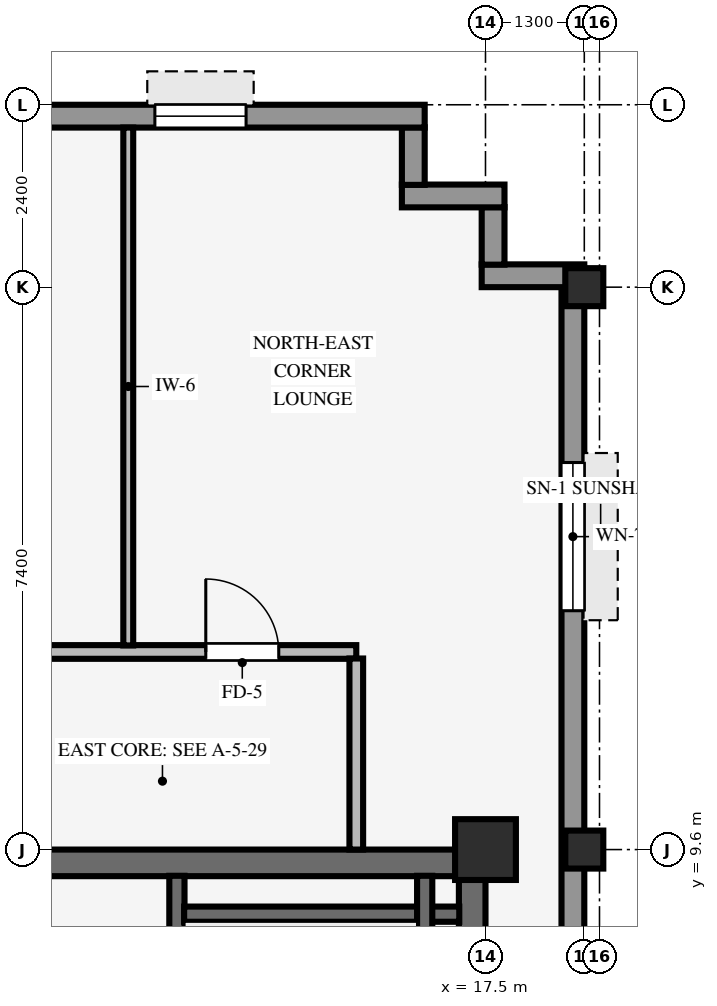
"""IFC4 building model, lengths in metres.
Left out: names, types, materials, properties, quantities, classifications, styles, units other than length and angle.
Written with IfcOpenShell. Run it as: python <this file> out.ifc"""

import sys

from ifc_helpers import new_model, si_unit, direction, frame, frame_2d, origin, origin_2d, place, context, subcontext, project, spatial, rectangle, hollow_rectangle, extrude, source, transform, mapped, element, fill, save


model = new_model("IFC4")
c1 = context("Model", 3, precision=1e-05, world=origin(), true_north=direction((0.0, 1.0)))
c2 = subcontext(c1, "Body", "Model", "MODEL_VIEW")
j1 = project(units=[si_unit("LENGTHUNIT", "METRE"), si_unit("PLANEANGLEUNIT", "RADIAN")], contexts=[c1])
p1 = place(None, origin())
s1 = spatial("IfcSite", under=j1, at=p1, CompositionType="ELEMENT")
p2 = place(p1, origin())
s2 = spatial("IfcBuilding", under=s1, at=p2, CompositionType="ELEMENT")
p3 = place(p2, frame((0.0, 0.0, 272.55)))
s3 = spatial("IfcBuildingStorey", under=s2, at=p3, CompositionType="ELEMENT", Elevation=272.55)
p4 = place(p3, frame((9.0, 9.425, 0.0), z_axis=(0.0, 0.0, 1.0), x_axis=(1.0, 0.0, 0.0)))
e1 = element("IfcWall", 1, at=p4, inside=s3, PredefinedType="SHEAR", context=c2, shape_type="SweptSolid", body=[
    extrude(rectangle(XDim=8.5, YDim=0.35, at=frame_2d((4.25, 0.0))), origin(), (0.0, 0.0, 1.0), 3.37),
])
p5 = place(p3, frame((17.325, -9.255, 0.0), z_axis=(0.0, 0.0, 1.0), x_axis=(0.0, 1.0, 0.0)))
e2 = element("IfcWall", 2, at=p5, inside=s3, PredefinedType="SHEAR", context=c2, shape_type="SweptSolid", body=[
    extrude(rectangle(XDim=18.51, YDim=0.35, at=frame_2d((9.255, 0.0))), origin(), (0.0, 0.0, 1.0), 3.37),
])
p6 = place(p3, frame((17.5, 9.6, 0.0), z_axis=(0.0, 0.0, 1.0), x_axis=(1.0, 0.0, 0.0)))
e3 = element("IfcColumn", 3, at=p6, inside=s3, PredefinedType="COLUMN", context=c2, shape_type="SweptSolid", body=[
    extrude(rectangle(XDim=0.8, YDim=0.8, at=origin_2d()), origin(), (0.0, 0.0, 1.0), 3.37),
])
for number, where, z_axis, x_axis in (
    (4, (18.8, 9.6, 0.0), (0.0, 0.0, 1.0), (1.0, 0.0, 0.0)),
    (5, (18.8, 17.0, 0.0), (0.0, 0.0, 1.0), (1.0, 0.0, 0.0)),
):
    element("IfcColumn", number, at=place(p3, frame(where, z_axis=z_axis, x_axis=x_axis)), inside=s3, PredefinedType="COLUMN", context=c2, shape_type="SweptSolid", body=[
        extrude(hollow_rectangle(XDim=0.5, YDim=0.5, WallThickness=0.032, InnerFilletRadius=0.032, OuterFilletRadius=0.064, at=origin_2d()), origin(), (0.0, 0.0, 1.0), 3.37),
    ])
p7 = place(p3, frame((18.65, -17.004, 0.0), z_axis=(0.0, 0.0, 1.0), x_axis=(0.0, 1.0, 0.0)))
e6 = element("IfcWall", 6, at=p7, inside=s3, PredefinedType="STANDARD", context=c2, shape_type="SweptSolid", body=[
    extrude(rectangle(XDim=34.008, YDim=0.3, at=frame_2d((17.004, 0.0))), origin(), (0.0, 0.0, 1.0), 2.705),
])
p8 = place(p7, frame((2.311, 0.0, 0.8)))
e7 = element("IfcOpeningElement", 7, at=p8, cuts=e6, PredefinedType="OPENING", context=c2, shape_type="SweptSolid", body=[
    extrude(rectangle(XDim=1.95, YDim=1.48, at=frame_2d((0.975, 0.74))), frame((0.0, 0.16, 0.0), z_axis=(0.0, -1.0, 0.0), x_axis=(1.0, 0.0, 0.0)), (0.0, 0.0, 1.0), 0.32),
])
p9 = place(p7, frame((29.747, 0.0, 0.8)))
e8 = element("IfcOpeningElement", 8, at=p9, cuts=e6, PredefinedType="OPENING", context=c2, shape_type="SweptSolid", body=[
    extrude(rectangle(XDim=1.95, YDim=1.48, at=frame_2d((0.975, 0.74))), frame((0.0, 0.16, 0.0), z_axis=(0.0, -1.0, 0.0), x_axis=(1.0, 0.0, 0.0)), (0.0, 0.0, 1.0), 0.32),
])
p10 = place(p3, frame((17.45, 17.15, 0.0), z_axis=(0.0, 0.0, 1.0), x_axis=(1.0, 0.0, 0.0)))
e9 = element("IfcWall", 9, at=p10, inside=s3, PredefinedType="STANDARD", context=c2, shape_type="SweptSolid", body=[
    extrude(rectangle(XDim=1.35, YDim=0.3, at=frame_2d((0.675, 0.0))), origin(), (0.0, 0.0, 1.0), 2.892),
])
p11 = place(p3, frame((17.6, 17.296, 0.0), z_axis=(0.0, 0.0, 1.0), x_axis=(0.0, 1.0, 0.0)))
e10 = element("IfcWall", 10, at=p11, inside=s3, PredefinedType="STANDARD", context=c2, shape_type="SweptSolid", body=[
    extrude(rectangle(XDim=0.758, YDim=0.3, at=frame_2d((0.379, 0.0))), origin(), (0.0, 0.0, 1.0), 2.892),
])
p12 = place(p3, frame((16.4, 18.2, 0.0), z_axis=(0.0, 0.0, 1.0), x_axis=(1.0, 0.0, 0.0)))
e11 = element("IfcWall", 11, at=p12, inside=s3, PredefinedType="STANDARD", context=c2, shape_type="SweptSolid", body=[
    extrude(rectangle(XDim=1.35, YDim=0.3, at=frame_2d((0.675, 0.0))), origin(), (0.0, 0.0, 1.0), 2.892),
])
p13 = place(p3, frame((16.55, 18.346, 0.0), z_axis=(0.0, 0.0, 1.0), x_axis=(0.0, 1.0, 0.0)))
e12 = element("IfcWall", 12, at=p13, inside=s3, PredefinedType="STANDARD", context=c2, shape_type="SweptSolid", body=[
    extrude(rectangle(XDim=0.758, YDim=0.3, at=frame_2d((0.379, 0.0))), origin(), (0.0, 0.0, 1.0), 2.892),
])
p14 = place(p3, frame((-18.9, 19.25, 0.0), z_axis=(0.0, 0.0, 1.0), x_axis=(1.0, 0.0, 0.0)))
e13 = element("IfcWall", 13, at=p14, inside=s3, PredefinedType="STANDARD", context=c2, shape_type="SweptSolid", body=[
    extrude(rectangle(XDim=35.6, YDim=0.3, at=frame_2d((17.8, 0.0))), origin(), (0.0, 0.0, 1.0), 2.705),
])
p15 = place(p14, frame((13.5, 0.0, 0.0)))
e14 = element("IfcOpeningElement", 14, at=p15, cuts=e13, PredefinedType="OPENING", context=c2, shape_type="SweptSolid", body=[
    extrude(rectangle(XDim=1.05, YDim=2.1, at=frame_2d((0.525, 1.05))), frame((0.0, 0.16, 0.0), z_axis=(0.0, -1.0, 0.0), x_axis=(1.0, 0.0, 0.0)), (0.0, 0.0, 1.0), 0.32),
])
p16 = place(p14, frame((3.7, 0.0, 0.8)))
e15 = element("IfcOpeningElement", 15, at=p16, cuts=e13, PredefinedType="OPENING", context=c2, shape_type="SweptSolid", body=[
    extrude(rectangle(XDim=1.2, YDim=1.48, at=frame_2d((0.6, 0.74))), frame((0.0, 0.16, 0.0), z_axis=(0.0, -1.0, 0.0), x_axis=(1.0, 0.0, 0.0)), (0.0, 0.0, 1.0), 0.32),
])
p17 = place(p14, frame((16.75, 0.0, 0.8)))
e16 = element("IfcOpeningElement", 16, at=p17, cuts=e13, PredefinedType="OPENING", context=c2, shape_type="SweptSolid", body=[
    extrude(rectangle(XDim=1.2, YDim=1.48, at=frame_2d((0.6, 0.74))), frame((0.0, 0.16, 0.0), z_axis=(0.0, -1.0, 0.0), x_axis=(1.0, 0.0, 0.0)), (0.0, 0.0, 1.0), 0.32),
])
p18 = place(p14, frame((22.0, 0.0, 0.8)))
e17 = element("IfcOpeningElement", 17, at=p18, cuts=e13, PredefinedType="OPENING", context=c2, shape_type="SweptSolid", body=[
    extrude(rectangle(XDim=1.2, YDim=1.48, at=frame_2d((0.6, 0.74))), frame((0.0, 0.16, 0.0), z_axis=(0.0, -1.0, 0.0), x_axis=(1.0, 0.0, 0.0)), (0.0, 0.0, 1.0), 0.32),
])
p19 = place(p14, frame((25.9, 0.0, 0.8)))
e18 = element("IfcOpeningElement", 18, at=p19, cuts=e13, PredefinedType="OPENING", context=c2, shape_type="SweptSolid", body=[
    extrude(rectangle(XDim=1.2, YDim=1.48, at=frame_2d((0.6, 0.74))), frame((0.0, 0.16, 0.0), z_axis=(0.0, -1.0, 0.0), x_axis=(1.0, 0.0, 0.0)), (0.0, 0.0, 1.0), 0.32),
])
p20 = place(p14, frame((32.05, 0.0, 0.8)))
e19 = element("IfcOpeningElement", 19, at=p20, cuts=e13, PredefinedType="OPENING", context=c2, shape_type="SweptSolid", body=[
    extrude(rectangle(XDim=1.2, YDim=1.48, at=frame_2d((0.6, 0.74))), frame((0.0, 0.16, 0.0), z_axis=(0.0, -1.0, 0.0), x_axis=(1.0, 0.0, 0.0)), (0.0, 0.0, 1.0), 0.32),
])
p21 = place(p3, frame((13.44, 0.9, 0.0), z_axis=(0.0, 0.0, 1.0), x_axis=(0.0, 1.0, 0.0)))
e20 = element("IfcWall", 20, at=p21, inside=s3, PredefinedType="SHEAR", context=c2, shape_type="SweptSolid", body=[
    extrude(rectangle(XDim=8.355, YDim=0.2, at=frame_2d((4.177, 0.0))), origin(), (0.0, 0.0, 1.0), 3.37),
])
p22 = place(p21, frame((0.43, 0.0, 0.0)))
e21 = element("IfcOpeningElement", 21, at=p22, cuts=e20, PredefinedType="OPENING", context=c2, shape_type="SweptSolid", body=[
    extrude(rectangle(XDim=1.1, YDim=2.15, at=frame_2d((0.55, 1.075))), frame((0.0, 0.11, 0.0), z_axis=(0.0, -1.0, 0.0), x_axis=(1.0, 0.0, 0.0)), (0.0, 0.0, 1.0), 0.22),
])
p23 = place(p3, frame((13.535, 8.75, 0.0), z_axis=(0.0, 0.0, 1.0), x_axis=(1.0, 0.0, 0.0)))
e22 = element("IfcWall", 22, at=p23, inside=s3, PredefinedType="SHEAR", context=c2, shape_type="SweptSolid", body=[
    extrude(rectangle(XDim=3.62, YDim=0.2, at=frame_2d((1.81, 0.0))), origin(), (0.0, 0.0, 1.0), 3.37),
])
p24 = place(p3, frame((16.7, 1.095, 0.0), z_axis=(0.0, 0.0, 1.0), x_axis=(0.0, 1.0, 0.0)))
e23 = element("IfcWall", 23, at=p24, inside=s3, PredefinedType="SHEAR", context=c2, shape_type="SweptSolid", body=[
    extrude(rectangle(XDim=8.16, YDim=0.2, at=frame_2d((4.08, 0.0))), origin(), (0.0, 0.0, 1.0), 3.37),
])
p25 = place(p3, frame((-15.0, 12.2, 0.0), z_axis=(0.0, 0.0, 1.0), x_axis=(1.0, 0.0, 0.0)))
e24 = element("IfcWall", 24, at=p25, inside=s3, PredefinedType="PARTITIONING", context=c2, shape_type="SweptSolid", body=[
    extrude(rectangle(XDim=30.8, YDim=0.18, at=frame_2d((15.4, 0.0))), origin(), (0.0, 0.0, 1.0), 3.36),
])
p26 = place(p25, frame((1.42, 0.0, 0.0)))
e25 = element("IfcOpeningElement", 25, at=p26, cuts=e24, PredefinedType="OPENING", context=c2, shape_type="SweptSolid", body=[
    extrude(rectangle(XDim=0.96, YDim=2.1, at=frame_2d((0.48, 1.05))), frame((0.0, 0.1, 0.0), z_axis=(0.0, -1.0, 0.0), x_axis=(1.0, 0.0, 0.0)), (0.0, 0.0, 1.0), 0.2),
])
p27 = place(p25, frame((25.42, 0.0, 0.0)))
e26 = element("IfcOpeningElement", 26, at=p27, cuts=e24, PredefinedType="OPENING", context=c2, shape_type="SweptSolid", body=[
    extrude(rectangle(XDim=0.96, YDim=2.1, at=frame_2d((0.48, 1.05))), frame((0.0, 0.1, 0.0), z_axis=(0.0, -1.0, 0.0), x_axis=(1.0, 0.0, 0.0)), (0.0, 0.0, 1.0), 0.2),
])
p28 = place(p25, frame((19.22, 0.0, 0.0)))
e27 = element("IfcOpeningElement", 27, at=p28, cuts=e24, PredefinedType="OPENING", context=c2, shape_type="SweptSolid", body=[
    extrude(rectangle(XDim=0.96, YDim=2.1, at=frame_2d((0.48, 1.05))), frame((0.0, 0.1, 0.0), z_axis=(0.0, -1.0, 0.0), x_axis=(1.0, 0.0, 0.0)), (0.0, 0.0, 1.0), 0.2),
])
p29 = place(p25, frame((28.82, 0.0, 0.0)))
e28 = element("IfcOpeningElement", 28, at=p29, cuts=e24, PredefinedType="OPENING", context=c2, shape_type="SweptSolid", body=[
    extrude(rectangle(XDim=0.96, YDim=2.1, at=frame_2d((0.48, 1.05))), frame((0.0, 0.1, 0.0), z_axis=(0.0, -1.0, 0.0), x_axis=(1.0, 0.0, 0.0)), (0.0, 0.0, 1.0), 0.2),
])
p30 = place(p25, frame((9.35, 0.0, 0.0)))
e29 = element("IfcOpeningElement", 29, at=p30, cuts=e24, PredefinedType="OPENING", context=c2, shape_type="SweptSolid", body=[
    extrude(rectangle(XDim=0.9, YDim=2.1, at=frame_2d((0.45, 1.05))), frame((0.0, 0.1, 0.0), z_axis=(0.0, -1.0, 0.0), x_axis=(1.0, 0.0, 0.0)), (0.0, 0.0, 1.0), 0.2),
])
p31 = place(p25, frame((12.15, 0.0, 0.0)))
e30 = element("IfcOpeningElement", 30, at=p31, cuts=e24, PredefinedType="OPENING", context=c2, shape_type="SweptSolid", body=[
    extrude(rectangle(XDim=0.9, YDim=2.1, at=frame_2d((0.45, 1.05))), frame((0.0, 0.1, 0.0), z_axis=(0.0, -1.0, 0.0), x_axis=(1.0, 0.0, 0.0)), (0.0, 0.0, 1.0), 0.2),
])
p32 = place(p25, frame((6.72, 0.0, 0.0)))
e31 = element("IfcOpeningElement", 31, at=p32, cuts=e24, PredefinedType="OPENING", context=c2, shape_type="SweptSolid", body=[
    extrude(rectangle(XDim=0.96, YDim=2.1, at=frame_2d((0.48, 1.05))), frame((0.0, 0.1, 0.0), z_axis=(0.0, -1.0, 0.0), x_axis=(1.0, 0.0, 0.0)), (0.0, 0.0, 1.0), 0.2),
])
p33 = place(p25, frame((16.25, 0.0, 0.0)))
e32 = element("IfcOpeningElement", 32, at=p33, cuts=e24, PredefinedType="OPENING", context=c2, shape_type="SweptSolid", body=[
    extrude(rectangle(XDim=0.9, YDim=2.1, at=frame_2d((0.45, 1.05))), frame((0.0, 0.1, 0.0), z_axis=(0.0, -1.0, 0.0), x_axis=(1.0, 0.0, 0.0)), (0.0, 0.0, 1.0), 0.2),
])
p34 = place(p3, frame((12.8, 12.286, 0.0), z_axis=(0.0, 0.0, 1.0), x_axis=(0.0, 1.0, 0.0)))
e33 = element("IfcWall", 33, at=p34, inside=s3, PredefinedType="PARTITIONING", context=c2, shape_type="SweptSolid", body=[
    extrude(rectangle(XDim=6.814, YDim=0.13, at=frame_2d((3.407, 0.0))), origin(), (0.0, 0.0, 1.0), 3.36),
])
p35 = place(p3, frame((15.8, 9.6, 0.0), z_axis=(0.0, 0.0, 1.0), x_axis=(0.0, 1.0, 0.0)))
e34 = element("IfcWall", 34, at=p35, inside=s3, PredefinedType="PARTITIONING", context=c2, shape_type="SweptSolid", body=[
    extrude(rectangle(XDim=2.514, YDim=0.18, at=frame_2d((1.257, 0.0))), origin(), (0.0, 0.0, 1.0), 3.36),
])
m1 = source(origin(), c2, "Body", "SweptSolid", [
    extrude(rectangle(XDim=1.95, YDim=1.48, at=frame_2d((0.975, 0.74))), frame((0.0, 0.03, 0.0), z_axis=(0.0, -1.0, 0.0), x_axis=(1.0, 0.0, 0.0)), (0.0, 0.0, 1.0), 0.06),
])
p36 = place(p9, origin())
e35 = element("IfcWindow", 35, at=p36, inside=s3, PartitioningType="SINGLE_PANEL", PredefinedType="WINDOW", context=c2, shape_type="MappedRepresentation", body=[
    mapped(m1, transform((0.0, 0.0, 0.0), scale=1.0)),
])
fill(e8, e35)
m2 = source(origin(), c2, "Body", "SweptSolid", [
    extrude(rectangle(XDim=1.2, YDim=1.48, at=frame_2d((0.6, 0.74))), frame((0.0, 0.03, 0.0), z_axis=(0.0, -1.0, 0.0), x_axis=(1.0, 0.0, 0.0)), (0.0, 0.0, 1.0), 0.06),
])
p37 = place(p20, origin())
e36 = element("IfcWindow", 36, at=p37, inside=s3, PartitioningType="SINGLE_PANEL", PredefinedType="WINDOW", context=c2, shape_type="MappedRepresentation", body=[
    mapped(m2, transform((0.0, 0.0, 0.0), scale=1.0)),
])
fill(e19, e36)
m3 = source(origin(), c2, "Body", "SweptSolid", [
    extrude(rectangle(XDim=0.96, YDim=2.1, at=frame_2d((0.48, 1.05))), frame((0.0, 0.025, 0.0), z_axis=(0.0, -1.0, 0.0), x_axis=(1.0, 0.0, 0.0)), (0.0, 0.0, 1.0), 0.05),
])
p38 = place(p29, origin())
e37 = element("IfcDoor", 37, at=p38, inside=s3, OperationType="SINGLE_SWING_LEFT", PredefinedType="DOOR", context=c2, shape_type="MappedRepresentation", body=[
    mapped(m3, transform((0.0, 0.0, 0.0), scale=1.0)),
])
fill(e28, e37)
save(model, sys.argv[1])
